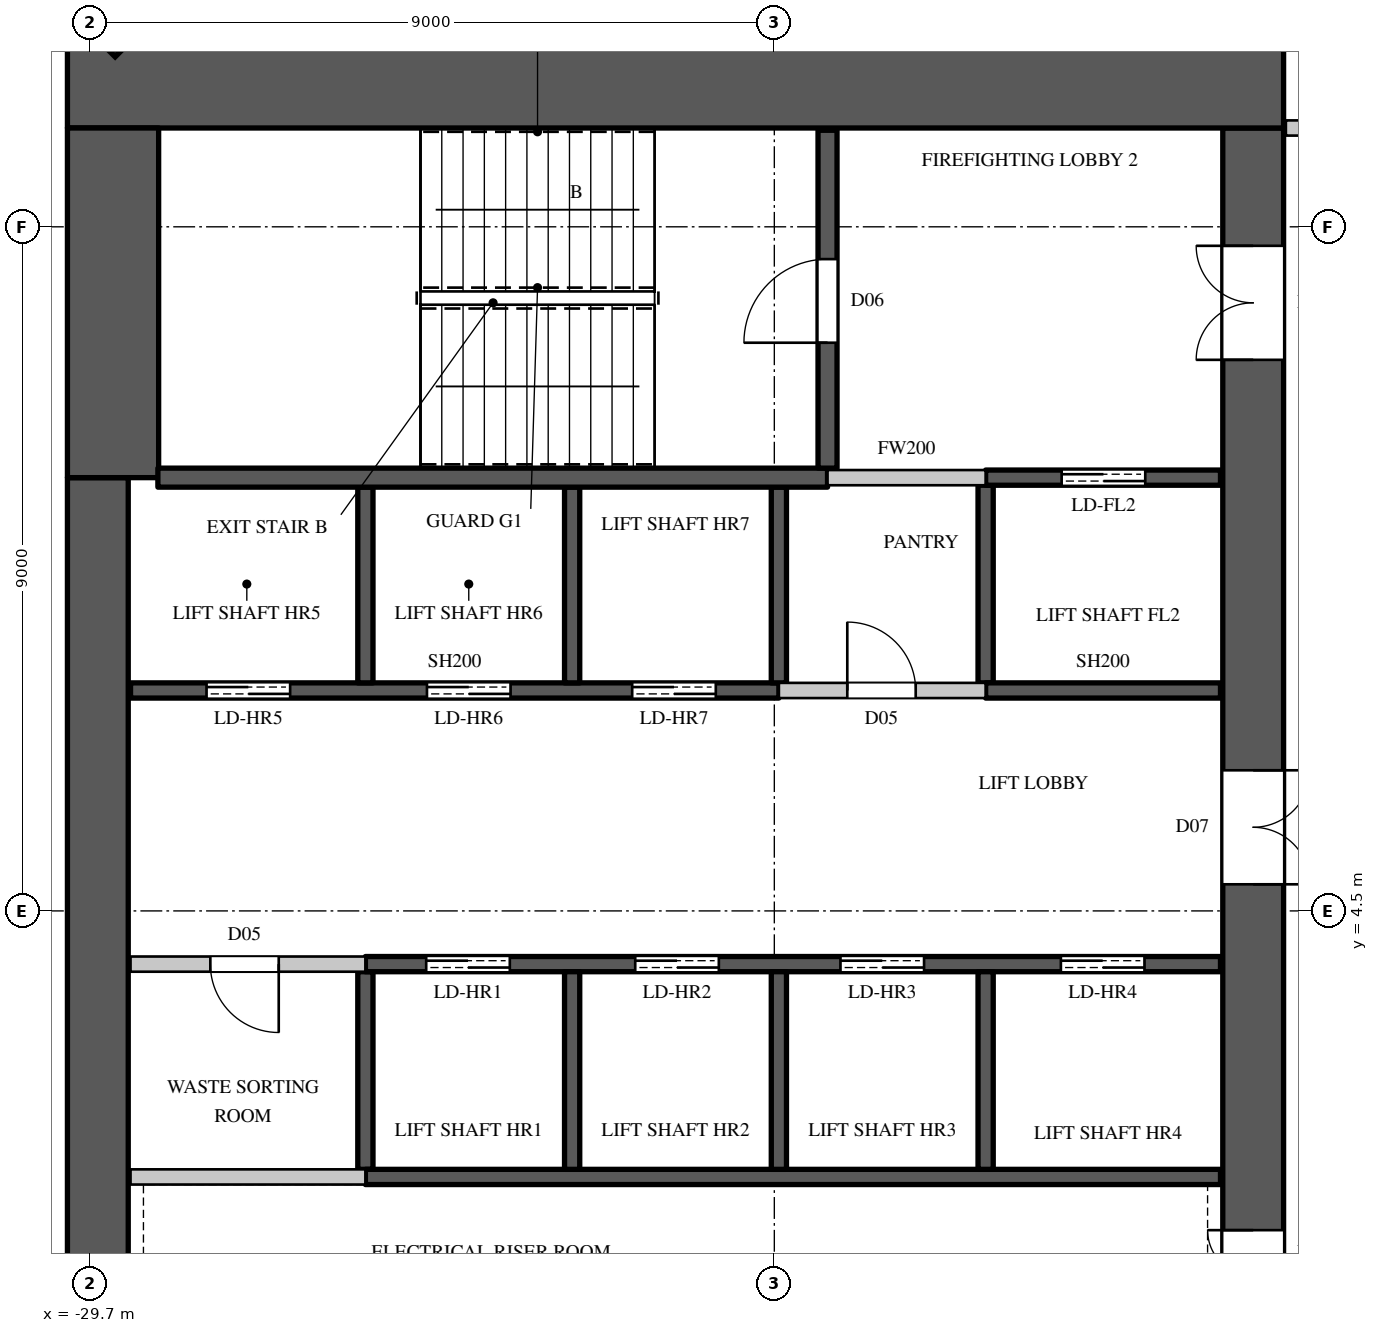
"""IFC4 building model, lengths in metres.
Left out: names, types, materials, properties, quantities, classifications, styles, units other than length and angle.
Written with IfcOpenShell. Run it as: python <this file> out.ifc"""

import sys

from ifc_helpers import new_model, si_unit, direction, frame, frame_2d, origin, origin_2d, place, context, subcontext, project, spatial, rectangle, extrude, element, fill, save


model = new_model("IFC4")
c1 = context("Model", 3, precision=1e-05, world=origin(), true_north=direction((0.0, 1.0)))
c2 = subcontext(c1, "Body", "Model", "MODEL_VIEW")
j1 = project(units=[si_unit("LENGTHUNIT", "METRE"), si_unit("PLANEANGLEUNIT", "RADIAN")], contexts=[c1])
p1 = place(None, origin())
s1 = spatial("IfcSite", under=j1, at=p1, CompositionType="ELEMENT")
p2 = place(p1, origin())
s2 = spatial("IfcBuilding", under=s1, at=p2, CompositionType="ELEMENT")
p3 = place(p2, frame((0.0, 0.0, 160.5)))
s3 = spatial("IfcBuildingStorey", under=s2, at=p3, CompositionType="ELEMENT", Elevation=160.5)
p4 = place(p3, frame((-29.443, 16.443, 0.0), z_axis=(0.0, 0.0, 1.0), x_axis=(-0.707106781187, -0.707106781187, 0.0)))
e1 = element("IfcColumn", 1, at=p4, inside=s3, PredefinedType="COLUMN", context=c2, shape_type="SweptSolid", body=[
    extrude(rectangle(XDim=0.9, YDim=1.1, at=origin_2d()), origin(), (0.0, 0.0, 1.0), 4.1),
])
p5 = place(p3, frame((-30.0, 15.4, 0.0), z_axis=(0.0, 0.0, 1.0), x_axis=(1.0, 0.0, 0.0)))
e2 = element("IfcWall", 2, at=p5, inside=s3, PredefinedType="SHEAR", context=c2, shape_type="SweptSolid", body=[
    extrude(rectangle(XDim=16.0, YDim=1.2, at=frame_2d((8.0, 0.0))), origin(), (0.0, 0.0, 1.0), 4.1),
])
p6 = place(p3, frame((-14.4, -14.8, 0.0), z_axis=(0.0, 0.0, 1.0), x_axis=(0.0, 1.0, 0.0)))
e3 = element("IfcWall", 3, at=p6, inside=s3, PredefinedType="SHEAR", context=c2, shape_type="SweptSolid", body=[
    extrude(rectangle(XDim=29.6, YDim=0.8, at=frame_2d((14.8, 0.0))), origin(), (0.0, 0.0, 1.0), 4.1),
])
p7 = place(p6, frame((1.55, 0.0, 0.0)))
e4 = element("IfcOpeningElement", 4, at=p7, cuts=e3, PredefinedType="OPENING", context=c2, shape_type="SweptSolid", body=[
    extrude(rectangle(XDim=1.5, YDim=2.4, at=frame_2d((0.75, 1.2))), frame((0.0, 0.41, 0.0), z_axis=(0.0, -1.0, 0.0), x_axis=(1.0, 0.0, 0.0)), (0.0, 0.0, 1.0), 0.82),
])
p8 = place(p6, frame((26.55, 0.0, 0.0)))
e5 = element("IfcOpeningElement", 5, at=p8, cuts=e3, PredefinedType="OPENING", context=c2, shape_type="SweptSolid", body=[
    extrude(rectangle(XDim=1.5, YDim=2.4, at=frame_2d((0.75, 1.2))), frame((0.0, 0.41, 0.0), z_axis=(0.0, -1.0, 0.0), x_axis=(1.0, 0.0, 0.0)), (0.0, 0.0, 1.0), 0.82),
])
p9 = place(p6, frame((8.45, 0.0, 0.0)))
e6 = element("IfcOpeningElement", 6, at=p9, cuts=e3, PredefinedType="OPENING", context=c2, shape_type="SweptSolid", body=[
    extrude(rectangle(XDim=1.5, YDim=2.4, at=frame_2d((0.75, 1.2))), frame((0.0, 0.41, 0.0), z_axis=(0.0, -1.0, 0.0), x_axis=(1.0, 0.0, 0.0)), (0.0, 0.0, 1.0), 0.82),
])
p10 = place(p6, frame((19.65, 0.0, 0.0)))
e7 = element("IfcOpeningElement", 7, at=p10, cuts=e3, PredefinedType="OPENING", context=c2, shape_type="SweptSolid", body=[
    extrude(rectangle(XDim=1.5, YDim=2.4, at=frame_2d((0.75, 1.2))), frame((0.0, 0.41, 0.0), z_axis=(0.0, -1.0, 0.0), x_axis=(1.0, 0.0, 0.0)), (0.0, 0.0, 1.0), 0.82),
])
p11 = place(p6, frame((14.5, 0.0, 0.0)))
e8 = element("IfcOpeningElement", 8, at=p11, cuts=e3, PredefinedType="OPENING", context=c2, shape_type="SweptSolid", body=[
    extrude(rectangle(XDim=0.6, YDim=2.0, at=frame_2d((0.3, 1.0))), frame((0.0, 0.41, 0.0), z_axis=(0.0, -1.0, 0.0), x_axis=(1.0, 0.0, 0.0)), (0.0, 0.0, 1.0), 0.82),
])
p12 = place(p3, frame((-29.6, -10.2, 0.0), z_axis=(0.0, 0.0, 1.0), x_axis=(0.0, 1.0, 0.0)))
e9 = element("IfcWall", 9, at=p12, inside=s3, PredefinedType="SHEAR", context=c2, shape_type="SweptSolid", body=[
    extrude(rectangle(XDim=20.4, YDim=0.8, at=frame_2d((10.2, 0.0))), origin(), (0.0, 0.0, 1.0), 4.1),
])
p13 = place(p3, frame((-29.4, 10.2, 0.0), z_axis=(0.0, 0.0, 1.0), x_axis=(0.0, 1.0, 0.0)))
e10 = element("IfcWall", 10, at=p13, inside=s3, PredefinedType="SHEAR", context=c2, shape_type="SweptSolid", body=[
    extrude(rectangle(XDim=4.6, YDim=1.2, at=frame_2d((2.3, 0.0))), origin(), (0.0, 0.0, 1.0), 4.1),
])
p14 = place(p3, frame((-29.17, 3.8, 0.0), z_axis=(0.0, 0.0, 1.0), x_axis=(1.0, 0.0, 0.0)))
e11 = element("IfcWall", 11, at=p14, inside=s3, PredefinedType="PARTITIONING", context=c2, shape_type="SweptSolid", body=[
    extrude(rectangle(XDim=3.09, YDim=0.2, at=frame_2d((1.545, 0.0))), origin(), (0.0, 0.0, 1.0), 3.8),
])
p15 = place(p14, frame((1.05, 0.0, 0.0)))
e12 = element("IfcOpeningElement", 12, at=p15, cuts=e11, PredefinedType="OPENING", context=c2, shape_type="SweptSolid", body=[
    extrude(rectangle(XDim=0.9, YDim=2.2, at=frame_2d((0.45, 1.1))), frame((0.0, 0.11, 0.0), z_axis=(0.0, -1.0, 0.0), x_axis=(1.0, 0.0, 0.0)), (0.0, 0.0, 1.0), 0.22),
])
p16 = place(p3, frame((-20.64, 7.4, 0.0), z_axis=(0.0, 0.0, 1.0), x_axis=(1.0, 0.0, 0.0)))
e13 = element("IfcWall", 13, at=p16, inside=s3, PredefinedType="PARTITIONING", context=c2, shape_type="SweptSolid", body=[
    extrude(rectangle(XDim=2.72, YDim=0.2, at=frame_2d((1.36, 0.0))), origin(), (0.0, 0.0, 1.0), 3.8),
])
p17 = place(p16, frame((0.9, 0.0, 0.0)))
e14 = element("IfcOpeningElement", 14, at=p17, cuts=e13, PredefinedType="OPENING", context=c2, shape_type="SweptSolid", body=[
    extrude(rectangle(XDim=0.9, YDim=2.2, at=frame_2d((0.45, 1.1))), frame((0.0, 0.11, 0.0), z_axis=(0.0, -1.0, 0.0), x_axis=(1.0, 0.0, 0.0)), (0.0, 0.0, 1.0), 0.22),
])
p18 = place(p3, frame((-20.0, 10.2, 0.0), z_axis=(0.0, 0.0, 1.0), x_axis=(1.0, 0.0, 0.0)))
e15 = element("IfcWall", 15, at=p18, inside=s3, PredefinedType="PARTITIONING", context=c2, shape_type="SweptSolid", body=[
    extrude(rectangle(XDim=2.08, YDim=0.2, at=frame_2d((1.04, 0.0))), origin(), (0.0, 0.0, 1.0), 3.8),
])
p19 = place(p3, frame((-13.97, 14.8, 0.0), z_axis=(0.0, 0.0, 1.0), x_axis=(1.0, 0.0, 0.0)))
e16 = element("IfcWall", 16, at=p19, inside=s3, PredefinedType="PARTITIONING", context=c2, shape_type="SweptSolid", body=[
    extrude(rectangle(XDim=2.87, YDim=0.2, at=frame_2d((1.435, 0.0))), origin(), (0.0, 0.0, 1.0), 3.8),
])
p20 = place(p3, frame((-29.17, 1.0, 0.0), z_axis=(0.0, 0.0, 1.0), x_axis=(1.0, 0.0, 0.0)))
e17 = element("IfcWall", 17, at=p20, inside=s3, PredefinedType="PARTITIONING", context=c2, shape_type="SweptSolid", body=[
    extrude(rectangle(XDim=3.09, YDim=0.2, at=frame_2d((1.545, 0.0))), origin(), (0.0, 0.0, 1.0), 3.8),
])
p21 = place(p3, frame((-29.17, 7.4, 0.0), z_axis=(0.0, 0.0, 1.0), x_axis=(1.0, 0.0, 0.0)))
e18 = element("IfcWall", 18, at=p21, inside=s3, PredefinedType="SHEAR", context=c2, shape_type="SweptSolid", body=[
    extrude(rectangle(XDim=8.53, YDim=0.2, at=frame_2d((4.265, 0.0))), origin(), (0.0, 0.0, 1.0), 3.8),
])
p22 = place(p21, frame((1.0, 0.0, 0.0)))
e19 = element("IfcOpeningElement", 19, at=p22, cuts=e18, PredefinedType="OPENING", context=c2, shape_type="SweptSolid", body=[
    extrude(rectangle(XDim=1.1, YDim=2.2, at=frame_2d((0.55, 1.1))), frame((0.0, 0.11, 0.0), z_axis=(0.0, -1.0, 0.0), x_axis=(1.0, 0.0, 0.0)), (0.0, 0.0, 1.0), 0.22),
])
p23 = place(p21, frame((3.9, 0.0, 0.0)))
e20 = element("IfcOpeningElement", 20, at=p23, cuts=e18, PredefinedType="OPENING", context=c2, shape_type="SweptSolid", body=[
    extrude(rectangle(XDim=1.1, YDim=2.2, at=frame_2d((0.55, 1.1))), frame((0.0, 0.11, 0.0), z_axis=(0.0, -1.0, 0.0), x_axis=(1.0, 0.0, 0.0)), (0.0, 0.0, 1.0), 0.22),
])
p24 = place(p21, frame((6.6, 0.0, 0.0)))
e21 = element("IfcOpeningElement", 21, at=p24, cuts=e18, PredefinedType="OPENING", context=c2, shape_type="SweptSolid", body=[
    extrude(rectangle(XDim=1.1, YDim=2.2, at=frame_2d((0.55, 1.1))), frame((0.0, 0.11, 0.0), z_axis=(0.0, -1.0, 0.0), x_axis=(1.0, 0.0, 0.0)), (0.0, 0.0, 1.0), 0.22),
])
p25 = place(p3, frame((-26.08, 1.1, 0.0), z_axis=(0.0, 0.0, 1.0), x_axis=(0.0, 1.0, 0.0)))
e22 = element("IfcWall", 22, at=p25, inside=s3, PredefinedType="SHEAR", context=c2, shape_type="SweptSolid", body=[
    extrude(rectangle(XDim=2.6, YDim=0.2, at=frame_2d((1.3, 0.0))), origin(), (0.0, 0.0, 1.0), 3.8),
])
p26 = place(p3, frame((-26.08, 1.0, 0.0), z_axis=(0.0, 0.0, 1.0), x_axis=(1.0, 0.0, 0.0)))
e23 = element("IfcWall", 23, at=p26, inside=s3, PredefinedType="SHEAR", context=c2, shape_type="SweptSolid", body=[
    extrude(rectangle(XDim=11.25, YDim=0.2, at=frame_2d((5.625, 0.0))), origin(), (0.0, 0.0, 1.0), 3.8),
])
p27 = place(p3, frame((-26.08, 3.8, 0.0), z_axis=(0.0, 0.0, 1.0), x_axis=(1.0, 0.0, 0.0)))
e24 = element("IfcWall", 24, at=p27, inside=s3, PredefinedType="SHEAR", context=c2, shape_type="SweptSolid", body=[
    extrude(rectangle(XDim=11.25, YDim=0.2, at=frame_2d((5.625, 0.0))), origin(), (0.0, 0.0, 1.0), 3.8),
])
p28 = place(p27, frame((0.8, 0.0, 0.0)))
e25 = element("IfcOpeningElement", 25, at=p28, cuts=e24, PredefinedType="OPENING", context=c2, shape_type="SweptSolid", body=[
    extrude(rectangle(XDim=1.1, YDim=2.2, at=frame_2d((0.55, 1.1))), frame((0.0, 0.11, 0.0), z_axis=(0.0, -1.0, 0.0), x_axis=(1.0, 0.0, 0.0)), (0.0, 0.0, 1.0), 0.22),
])
p29 = place(p27, frame((3.55, 0.0, 0.0)))
e26 = element("IfcOpeningElement", 26, at=p29, cuts=e24, PredefinedType="OPENING", context=c2, shape_type="SweptSolid", body=[
    extrude(rectangle(XDim=1.1, YDim=2.2, at=frame_2d((0.55, 1.1))), frame((0.0, 0.11, 0.0), z_axis=(0.0, -1.0, 0.0), x_axis=(1.0, 0.0, 0.0)), (0.0, 0.0, 1.0), 0.22),
])
p30 = place(p27, frame((6.25, 0.0, 0.0)))
e27 = element("IfcOpeningElement", 27, at=p30, cuts=e24, PredefinedType="OPENING", context=c2, shape_type="SweptSolid", body=[
    extrude(rectangle(XDim=1.1, YDim=2.2, at=frame_2d((0.55, 1.1))), frame((0.0, 0.11, 0.0), z_axis=(0.0, -1.0, 0.0), x_axis=(1.0, 0.0, 0.0)), (0.0, 0.0, 1.0), 0.22),
])
p31 = place(p27, frame((9.15, 0.0, 0.0)))
e28 = element("IfcOpeningElement", 28, at=p31, cuts=e24, PredefinedType="OPENING", context=c2, shape_type="SweptSolid", body=[
    extrude(rectangle(XDim=1.1, YDim=2.2, at=frame_2d((0.55, 1.1))), frame((0.0, 0.11, 0.0), z_axis=(0.0, -1.0, 0.0), x_axis=(1.0, 0.0, 0.0)), (0.0, 0.0, 1.0), 0.22),
])
p32 = place(p3, frame((-26.08, 7.5, 0.0), z_axis=(0.0, 0.0, 1.0), x_axis=(0.0, 1.0, 0.0)))
e29 = element("IfcWall", 29, at=p32, inside=s3, PredefinedType="SHEAR", context=c2, shape_type="SweptSolid", body=[
    extrude(rectangle(XDim=2.575, YDim=0.2, at=frame_2d((1.288, 0.0))), origin(), (0.0, 0.0, 1.0), 4.1),
])
p33 = place(p3, frame((-23.36, 1.1, 0.0), z_axis=(0.0, 0.0, 1.0), x_axis=(0.0, 1.0, 0.0)))
e30 = element("IfcWall", 30, at=p33, inside=s3, PredefinedType="SHEAR", context=c2, shape_type="SweptSolid", body=[
    extrude(rectangle(XDim=2.6, YDim=0.2, at=frame_2d((1.3, 0.0))), origin(), (0.0, 0.0, 1.0), 4.1),
])
p34 = place(p3, frame((-23.36, 7.5, 0.0), z_axis=(0.0, 0.0, 1.0), x_axis=(0.0, 1.0, 0.0)))
e31 = element("IfcWall", 31, at=p34, inside=s3, PredefinedType="SHEAR", context=c2, shape_type="SweptSolid", body=[
    extrude(rectangle(XDim=2.575, YDim=0.2, at=frame_2d((1.288, 0.0))), origin(), (0.0, 0.0, 1.0), 4.1),
])
p35 = place(p3, frame((-20.64, 1.1, 0.0), z_axis=(0.0, 0.0, 1.0), x_axis=(0.0, 1.0, 0.0)))
e32 = element("IfcWall", 32, at=p35, inside=s3, PredefinedType="SHEAR", context=c2, shape_type="SweptSolid", body=[
    extrude(rectangle(XDim=2.6, YDim=0.2, at=frame_2d((1.3, 0.0))), origin(), (0.0, 0.0, 1.0), 4.1),
])
p36 = place(p3, frame((-20.64, 7.5, 0.0), z_axis=(0.0, 0.0, 1.0), x_axis=(0.0, 1.0, 0.0)))
e33 = element("IfcWall", 33, at=p36, inside=s3, PredefinedType="SHEAR", context=c2, shape_type="SweptSolid", body=[
    extrude(rectangle(XDim=2.575, YDim=0.2, at=frame_2d((1.288, 0.0))), origin(), (0.0, 0.0, 1.0), 3.8),
])
p37 = place(p3, frame((-17.92, 1.1, 0.0), z_axis=(0.0, 0.0, 1.0), x_axis=(0.0, 1.0, 0.0)))
e34 = element("IfcWall", 34, at=p37, inside=s3, PredefinedType="SHEAR", context=c2, shape_type="SweptSolid", body=[
    extrude(rectangle(XDim=2.6, YDim=0.2, at=frame_2d((1.3, 0.0))), origin(), (0.0, 0.0, 1.0), 4.1),
])
p38 = place(p3, frame((-17.92, 7.5, 0.0), z_axis=(0.0, 0.0, 1.0), x_axis=(0.0, 1.0, 0.0)))
e35 = element("IfcWall", 35, at=p38, inside=s3, PredefinedType="SHEAR", context=c2, shape_type="SweptSolid", body=[
    extrude(rectangle(XDim=2.6, YDim=0.2, at=frame_2d((1.3, 0.0))), origin(), (0.0, 0.0, 1.0), 3.8),
])
p39 = place(p3, frame((-17.92, 7.4, 0.0), z_axis=(0.0, 0.0, 1.0), x_axis=(1.0, 0.0, 0.0)))
e36 = element("IfcWall", 36, at=p39, inside=s3, PredefinedType="SHEAR", context=c2, shape_type="SweptSolid", body=[
    extrude(rectangle(XDim=3.09, YDim=0.2, at=frame_2d((1.545, 0.0))), origin(), (0.0, 0.0, 1.0), 3.8),
])
p40 = place(p3, frame((-17.92, 10.2, 0.0), z_axis=(0.0, 0.0, 1.0), x_axis=(1.0, 0.0, 0.0)))
e37 = element("IfcWall", 37, at=p40, inside=s3, PredefinedType="SHEAR", context=c2, shape_type="SweptSolid", body=[
    extrude(rectangle(XDim=3.09, YDim=0.2, at=frame_2d((1.545, 0.0))), origin(), (0.0, 0.0, 1.0), 3.8),
])
p41 = place(p40, frame((1.0, 0.0, 0.0)))
e38 = element("IfcOpeningElement", 38, at=p41, cuts=e37, PredefinedType="OPENING", context=c2, shape_type="SweptSolid", body=[
    extrude(rectangle(XDim=1.1, YDim=2.2, at=frame_2d((0.55, 1.1))), frame((0.0, 0.11, 0.0), z_axis=(0.0, -1.0, 0.0), x_axis=(1.0, 0.0, 0.0)), (0.0, 0.0, 1.0), 0.22),
])
p42 = place(p3, frame((-28.81, 10.2, 0.0), z_axis=(0.0, 0.0, 1.0), x_axis=(1.0, 0.0, 0.0)))
e39 = element("IfcWall", 39, at=p42, inside=s3, PredefinedType="SHEAR", context=c2, shape_type="SweptSolid", body=[
    extrude(rectangle(XDim=8.81, YDim=0.25, at=frame_2d((4.405, 0.0))), origin(), (0.0, 0.0, 1.0), 3.8),
])
p43 = place(p3, frame((-20.0, 10.325, 0.0), z_axis=(0.0, 0.0, 1.0), x_axis=(0.0, 1.0, 0.0)))
e40 = element("IfcWall", 40, at=p43, inside=s3, PredefinedType="SHEAR", context=c2, shape_type="SweptSolid", body=[
    extrude(rectangle(XDim=4.445, YDim=0.25, at=frame_2d((2.223, 0.0))), origin(), (0.0, 0.0, 1.0), 3.8),
])
p44 = place(p43, frame((1.65, 0.0, 0.0)))
e41 = element("IfcOpeningElement", 41, at=p44, cuts=e40, PredefinedType="OPENING", context=c2, shape_type="SweptSolid", body=[
    extrude(rectangle(XDim=1.1, YDim=2.2, at=frame_2d((0.55, 1.1))), frame((0.0, 0.135, 0.0), z_axis=(0.0, -1.0, 0.0), x_axis=(1.0, 0.0, 0.0)), (0.0, 0.0, 1.0), 0.27),
])
p45 = place(p44, origin())
e42 = element("IfcDoor", 42, at=p45, inside=s3, OperationType="SINGLE_SWING_LEFT", PredefinedType="DOOR", context=c2, shape_type="SweptSolid", body=[
    extrude(rectangle(XDim=1.1, YDim=2.2, at=frame_2d((0.55, 1.1))), frame((0.0, 0.025, 0.0), z_axis=(0.0, -1.0, 0.0), x_axis=(1.0, 0.0, 0.0)), (0.0, 0.0, 1.0), 0.05),
])
fill(e41, e42)
p46 = place(p15, origin())
e43 = element("IfcDoor", 43, at=p46, inside=s3, OperationType="SINGLE_SWING_LEFT", PredefinedType="DOOR", context=c2, shape_type="SweptSolid", body=[
    extrude(rectangle(XDim=0.9, YDim=2.2, at=frame_2d((0.45, 1.1))), frame((0.0, 0.025, 0.0), z_axis=(0.0, -1.0, 0.0), x_axis=(1.0, 0.0, 0.0)), (0.0, 0.0, 1.0), 0.05),
])
fill(e12, e43)
p47 = place(p17, origin())
e44 = element("IfcDoor", 44, at=p47, inside=s3, OperationType="SINGLE_SWING_LEFT", PredefinedType="DOOR", context=c2, shape_type="SweptSolid", body=[
    extrude(rectangle(XDim=0.9, YDim=2.2, at=frame_2d((0.45, 1.1))), frame((0.0, 0.025, 0.0), z_axis=(0.0, -1.0, 0.0), x_axis=(1.0, 0.0, 0.0)), (0.0, 0.0, 1.0), 0.05),
])
fill(e14, e44)
p48 = place(p28, origin())
e45 = element("IfcDoor", 45, at=p48, inside=s3, OperationType="DOUBLE_DOOR_SLIDING", PredefinedType="DOOR", context=c2, shape_type="SweptSolid", body=[
    extrude(rectangle(XDim=1.1, YDim=2.2, at=frame_2d((0.55, 1.1))), frame((0.0, 0.025, 0.0), z_axis=(0.0, -1.0, 0.0), x_axis=(1.0, 0.0, 0.0)), (0.0, 0.0, 1.0), 0.05),
])
fill(e25, e45)
p49 = place(p29, origin())
e46 = element("IfcDoor", 46, at=p49, inside=s3, OperationType="DOUBLE_DOOR_SLIDING", PredefinedType="DOOR", context=c2, shape_type="SweptSolid", body=[
    extrude(rectangle(XDim=1.1, YDim=2.2, at=frame_2d((0.55, 1.1))), frame((0.0, 0.025, 0.0), z_axis=(0.0, -1.0, 0.0), x_axis=(1.0, 0.0, 0.0)), (0.0, 0.0, 1.0), 0.05),
])
fill(e26, e46)
p50 = place(p30, origin())
e47 = element("IfcDoor", 47, at=p50, inside=s3, OperationType="DOUBLE_DOOR_SLIDING", PredefinedType="DOOR", context=c2, shape_type="SweptSolid", body=[
    extrude(rectangle(XDim=1.1, YDim=2.2, at=frame_2d((0.55, 1.1))), frame((0.0, 0.025, 0.0), z_axis=(0.0, -1.0, 0.0), x_axis=(1.0, 0.0, 0.0)), (0.0, 0.0, 1.0), 0.05),
])
fill(e27, e47)
p51 = place(p31, origin())
e48 = element("IfcDoor", 48, at=p51, inside=s3, OperationType="DOUBLE_DOOR_SLIDING", PredefinedType="DOOR", context=c2, shape_type="SweptSolid", body=[
    extrude(rectangle(XDim=1.1, YDim=2.2, at=frame_2d((0.55, 1.1))), frame((0.0, 0.025, 0.0), z_axis=(0.0, -1.0, 0.0), x_axis=(1.0, 0.0, 0.0)), (0.0, 0.0, 1.0), 0.05),
])
fill(e28, e48)
p52 = place(p22, origin())
e49 = element("IfcDoor", 49, at=p52, inside=s3, OperationType="DOUBLE_DOOR_SLIDING", PredefinedType="DOOR", context=c2, shape_type="SweptSolid", body=[
    extrude(rectangle(XDim=1.1, YDim=2.2, at=frame_2d((0.55, 1.1))), frame((0.0, 0.025, 0.0), z_axis=(0.0, -1.0, 0.0), x_axis=(1.0, 0.0, 0.0)), (0.0, 0.0, 1.0), 0.05),
])
fill(e19, e49)
p53 = place(p23, origin())
e50 = element("IfcDoor", 50, at=p53, inside=s3, OperationType="DOUBLE_DOOR_SLIDING", PredefinedType="DOOR", context=c2, shape_type="SweptSolid", body=[
    extrude(rectangle(XDim=1.1, YDim=2.2, at=frame_2d((0.55, 1.1))), frame((0.0, 0.025, 0.0), z_axis=(0.0, -1.0, 0.0), x_axis=(1.0, 0.0, 0.0)), (0.0, 0.0, 1.0), 0.05),
])
fill(e20, e50)
p54 = place(p24, origin())
e51 = element("IfcDoor", 51, at=p54, inside=s3, OperationType="DOUBLE_DOOR_SLIDING", PredefinedType="DOOR", context=c2, shape_type="SweptSolid", body=[
    extrude(rectangle(XDim=1.1, YDim=2.2, at=frame_2d((0.55, 1.1))), frame((0.0, 0.025, 0.0), z_axis=(0.0, -1.0, 0.0), x_axis=(1.0, 0.0, 0.0)), (0.0, 0.0, 1.0), 0.05),
])
fill(e21, e51)
p55 = place(p41, origin())
e52 = element("IfcDoor", 52, at=p55, inside=s3, OperationType="DOUBLE_DOOR_SLIDING", PredefinedType="DOOR", context=c2, shape_type="SweptSolid", body=[
    extrude(rectangle(XDim=1.1, YDim=2.2, at=frame_2d((0.55, 1.1))), frame((0.0, 0.025, 0.0), z_axis=(0.0, -1.0, 0.0), x_axis=(1.0, 0.0, 0.0)), (0.0, 0.0, 1.0), 0.05),
])
fill(e38, e52)
p56 = place(p8, origin())
e53 = element("IfcDoor", 53, at=p56, inside=s3, OperationType="DOUBLE_DOOR_SINGLE_SWING", PredefinedType="DOOR", context=c2, shape_type="SweptSolid", body=[
    extrude(rectangle(XDim=1.5, YDim=2.4, at=frame_2d((0.75, 1.2))), frame((0.0, 0.395, 0.0), z_axis=(0.0, -1.0, 0.0), x_axis=(1.0, 0.0, 0.0)), (0.0, 0.0, 1.0), 0.05),
])
fill(e5, e53)
p57 = place(p10, origin())
e54 = element("IfcDoor", 54, at=p57, inside=s3, OperationType="DOUBLE_DOOR_SINGLE_SWING", PredefinedType="DOOR", context=c2, shape_type="SweptSolid", body=[
    extrude(rectangle(XDim=1.5, YDim=2.4, at=frame_2d((0.75, 1.2))), frame((0.0, -0.345, 0.0), z_axis=(0.0, -1.0, 0.0), x_axis=(1.0, 0.0, 0.0)), (0.0, 0.0, 1.0), 0.05),
])
fill(e7, e54)
p58 = place(p11, origin())
e55 = element("IfcDoor", 55, at=p58, inside=s3, OperationType="SINGLE_SWING_RIGHT", PredefinedType="DOOR", context=c2, shape_type="SweptSolid", body=[
    extrude(rectangle(XDim=0.6, YDim=2.0, at=frame_2d((0.3, 1.0))), frame((0.0, 0.395, 0.0), z_axis=(0.0, -1.0, 0.0), x_axis=(1.0, 0.0, 0.0)), (0.0, 0.0, 1.0), 0.05),
])
fill(e8, e55)
save(model, sys.argv[1])
